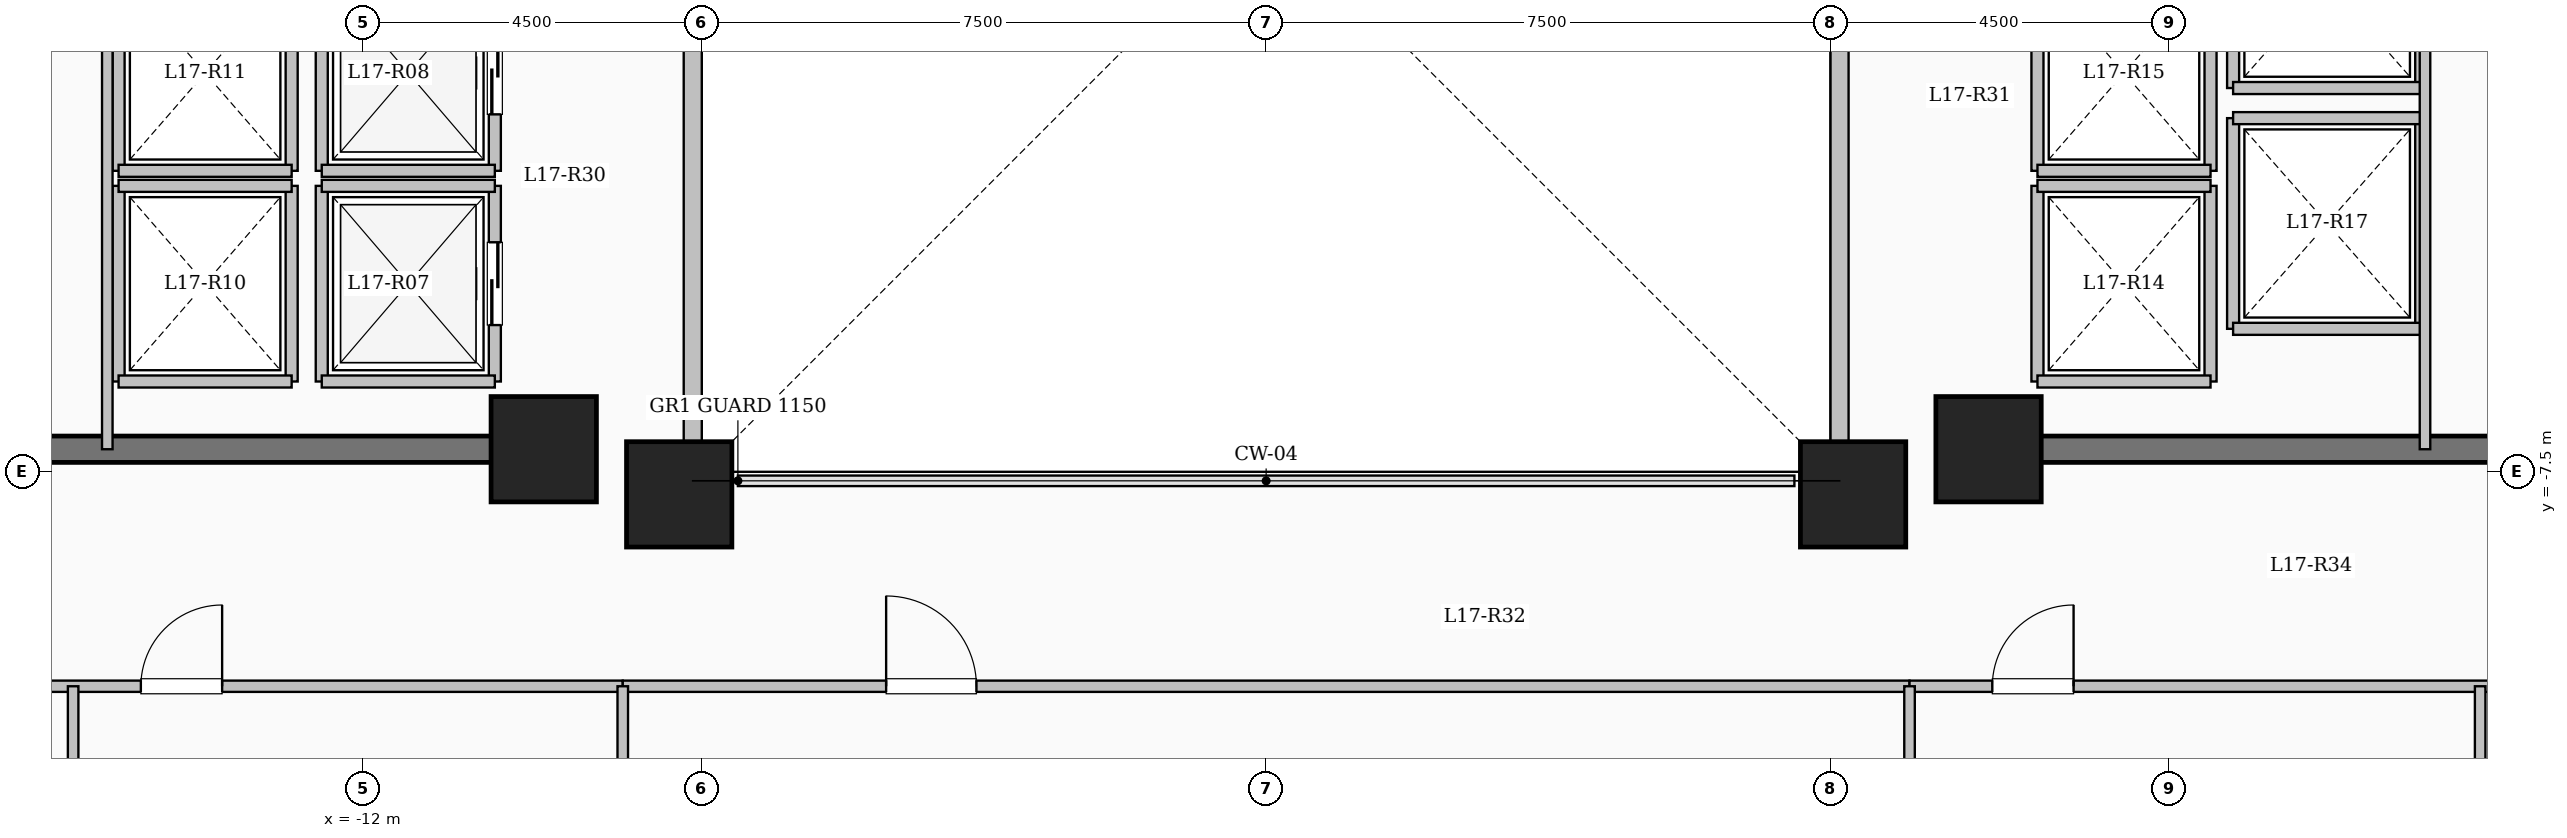
"""IFC4 building model, lengths in metres.
Left out: names, types, materials, properties, quantities, classifications, styles, units other than length and angle.
Written with IfcOpenShell. Run it as: python <this file> out.ifc"""

import sys

from ifc_helpers import new_model, si_unit, direction, frame, frame_2d, origin, origin_2d, place, context, subcontext, project, spatial, rectangle, extrude, element, fill, save


model = new_model("IFC4")
c1 = context("Model", 3, precision=1e-05, world=origin(), true_north=direction((0.0, 1.0)))
c2 = subcontext(c1, "Body", "Model", "MODEL_VIEW")
j1 = project(units=[si_unit("LENGTHUNIT", "METRE"), si_unit("PLANEANGLEUNIT", "RADIAN")], contexts=[c1])
p1 = place(None, origin())
s1 = spatial("IfcSite", under=j1, at=p1, CompositionType="ELEMENT")
p2 = place(p1, origin())
s2 = spatial("IfcBuilding", under=s1, at=p2, CompositionType="ELEMENT")
p3 = place(p2, frame((0.0, 0.0, 64.2)))
s3 = spatial("IfcBuildingStorey", under=s2, at=p3, CompositionType="ELEMENT", Elevation=64.2)
for number, where, z_axis, x_axis in (
    (1, (-7.8, -7.8, 0.0), (0.0, 0.0, 1.0), (1.0, 0.0, 0.0)),
    (2, (7.8, -7.8, 0.0), (0.0, 0.0, 1.0), (1.0, 0.0, 0.0)),
    (3, (-9.6, -7.2, 0.0), (0.0, 0.0, 1.0), (1.0, 0.0, 0.0)),
    (4, (9.6, -7.2, 0.0), (0.0, 0.0, 1.0), (1.0, 0.0, 0.0)),
):
    element("IfcColumn", number, at=place(p3, frame(where, z_axis=z_axis, x_axis=x_axis)), inside=s3, PredefinedType="COLUMN", context=c2, shape_type="SweptSolid", body=[
        extrude(rectangle(XDim=1.4, YDim=1.4, at=origin_2d()), origin(), (0.0, 0.0, 1.0), 4.5),
    ])
p4 = place(p3, frame((7.62, -7.62, 0.0), z_axis=(0.0, 0.0, 1.0), x_axis=(0.0, 1.0, 0.0)))
e5 = element("IfcWall", 5, at=p4, inside=s3, PredefinedType="SOLIDWALL", context=c2, shape_type="SweptSolid", body=[
    extrude(rectangle(XDim=15.24, YDim=0.24, at=frame_2d((7.62, 0.0))), origin(), (0.0, 0.0, 1.0), 4.2),
])
p5 = place(p4, frame((6.92, 0.0, 0.95)))
e6 = element("IfcOpeningElement", 6, at=p5, cuts=e5, PredefinedType="OPENING", context=c2, shape_type="SweptSolid", body=[
    extrude(rectangle(XDim=1.4, YDim=1.5, at=frame_2d((0.7, 0.75))), frame((0.0, 0.13, 0.0), z_axis=(0.0, -1.0, 0.0), x_axis=(1.0, 0.0, 0.0)), (0.0, 0.0, 1.0), 0.26),
])
p6 = place(p3, frame((-7.62, 7.62, 0.0), z_axis=(0.0, 0.0, 1.0), x_axis=(0.0, -1.0, 0.0)))
e7 = element("IfcWall", 7, at=p6, inside=s3, PredefinedType="SOLIDWALL", context=c2, shape_type="SweptSolid", body=[
    extrude(rectangle(XDim=15.24, YDim=0.24, at=frame_2d((7.62, 0.0))), origin(), (0.0, 0.0, 1.0), 4.2),
])
p7 = place(p6, frame((6.92, 0.0, 0.95)))
e8 = element("IfcOpeningElement", 8, at=p7, cuts=e7, PredefinedType="OPENING", context=c2, shape_type="SweptSolid", body=[
    extrude(rectangle(XDim=1.4, YDim=1.5, at=frame_2d((0.7, 0.75))), frame((0.0, 0.13, 0.0), z_axis=(0.0, -1.0, 0.0), x_axis=(1.0, 0.0, 0.0)), (0.0, 0.0, 1.0), 0.26),
])
p8 = place(p3, frame((-12.55, -6.3, 0.0), z_axis=(0.0, 0.0, 1.0), x_axis=(0.0, 1.0, 0.0)))
e9 = element("IfcWall", 9, at=p8, inside=s3, PredefinedType="SOLIDWALL", context=c2, shape_type="SweptSolid", body=[
    extrude(rectangle(XDim=2.6, YDim=0.16, at=frame_2d((1.3, 0.0))), origin(), (0.0, 0.0, 1.0), 4.2),
])
p9 = place(p3, frame((-10.25, -6.3, 0.0), z_axis=(0.0, 0.0, 1.0), x_axis=(0.0, 1.0, 0.0)))
e10 = element("IfcWall", 10, at=p9, inside=s3, PredefinedType="SOLIDWALL", context=c2, shape_type="SweptSolid", body=[
    extrude(rectangle(XDim=2.6, YDim=0.16, at=frame_2d((1.3, 0.0))), origin(), (0.0, 0.0, 1.0), 4.2),
])
p10 = place(p9, frame((0.75, 0.0, 0.0)))
e11 = element("IfcOpeningElement", 11, at=p10, cuts=e10, PredefinedType="OPENING", context=c2, shape_type="SweptSolid", body=[
    extrude(rectangle(XDim=1.1, YDim=2.15, at=frame_2d((0.55, 1.075))), frame((0.0, 0.09, 0.0), z_axis=(0.0, -1.0, 0.0), x_axis=(1.0, 0.0, 0.0)), (0.0, 0.0, 1.0), 0.18),
])
for number, where, z_axis, x_axis in (
    (12, (-12.55, -6.3, 0.0), (0.0, 0.0, 1.0), (1.0, 0.0, 0.0)),
    (13, (-12.55, -3.7, 0.0), (0.0, 0.0, 1.0), (1.0, 0.0, 0.0)),
):
    element("IfcWall", number, at=place(p3, frame(where, z_axis=z_axis, x_axis=x_axis)), inside=s3, PredefinedType="SOLIDWALL", context=c2, shape_type="SweptSolid", body=[
        extrude(rectangle(XDim=2.3, YDim=0.16, at=frame_2d((1.15, 0.0))), origin(), (0.0, 0.0, 1.0), 4.2),
    ])
p11 = place(p3, frame((-12.55, -3.5, 0.0), z_axis=(0.0, 0.0, 1.0), x_axis=(0.0, 1.0, 0.0)))
e14 = element("IfcWall", 14, at=p11, inside=s3, PredefinedType="SOLIDWALL", context=c2, shape_type="SweptSolid", body=[
    extrude(rectangle(XDim=2.6, YDim=0.16, at=frame_2d((1.3, 0.0))), origin(), (0.0, 0.0, 1.0), 4.2),
])
p12 = place(p3, frame((-10.25, -3.5, 0.0), z_axis=(0.0, 0.0, 1.0), x_axis=(0.0, 1.0, 0.0)))
e15 = element("IfcWall", 15, at=p12, inside=s3, PredefinedType="SOLIDWALL", context=c2, shape_type="SweptSolid", body=[
    extrude(rectangle(XDim=2.6, YDim=0.16, at=frame_2d((1.3, 0.0))), origin(), (0.0, 0.0, 1.0), 4.2),
])
p13 = place(p12, frame((0.75, 0.0, 0.0)))
e16 = element("IfcOpeningElement", 16, at=p13, cuts=e15, PredefinedType="OPENING", context=c2, shape_type="SweptSolid", body=[
    extrude(rectangle(XDim=1.1, YDim=2.15, at=frame_2d((0.55, 1.075))), frame((0.0, 0.09, 0.0), z_axis=(0.0, -1.0, 0.0), x_axis=(1.0, 0.0, 0.0)), (0.0, 0.0, 1.0), 0.18),
])
p14 = place(p3, frame((-12.55, -3.5, 0.0), z_axis=(0.0, 0.0, 1.0), x_axis=(1.0, 0.0, 0.0)))
e17 = element("IfcWall", 17, at=p14, inside=s3, PredefinedType="SOLIDWALL", context=c2, shape_type="SweptSolid", body=[
    extrude(rectangle(XDim=2.3, YDim=0.16, at=frame_2d((1.15, 0.0))), origin(), (0.0, 0.0, 1.0), 4.2),
])
for number, where, z_axis, x_axis in (
    (18, (-15.25, -6.3, 0.0), (0.0, 0.0, 1.0), (0.0, 1.0, 0.0)),
    (19, (-12.95, -6.3, 0.0), (0.0, 0.0, 1.0), (0.0, 1.0, 0.0)),
):
    element("IfcWall", number, at=place(p3, frame(where, z_axis=z_axis, x_axis=x_axis)), inside=s3, PredefinedType="SOLIDWALL", context=c2, shape_type="SweptSolid", body=[
        extrude(rectangle(XDim=2.6, YDim=0.16, at=frame_2d((1.3, 0.0))), origin(), (0.0, 0.0, 1.0), 4.2),
    ])
for number, where, z_axis, x_axis in (
    (20, (-15.25, -6.3, 0.0), (0.0, 0.0, 1.0), (1.0, 0.0, 0.0)),
    (21, (-15.25, -3.7, 0.0), (0.0, 0.0, 1.0), (1.0, 0.0, 0.0)),
):
    element("IfcWall", number, at=place(p3, frame(where, z_axis=z_axis, x_axis=x_axis)), inside=s3, PredefinedType="SOLIDWALL", context=c2, shape_type="SweptSolid", body=[
        extrude(rectangle(XDim=2.3, YDim=0.16, at=frame_2d((1.15, 0.0))), origin(), (0.0, 0.0, 1.0), 4.2),
    ])
for number, where, z_axis, x_axis in (
    (22, (-15.25, -3.5, 0.0), (0.0, 0.0, 1.0), (0.0, 1.0, 0.0)),
    (23, (-12.95, -3.5, 0.0), (0.0, 0.0, 1.0), (0.0, 1.0, 0.0)),
):
    element("IfcWall", number, at=place(p3, frame(where, z_axis=z_axis, x_axis=x_axis)), inside=s3, PredefinedType="SOLIDWALL", context=c2, shape_type="SweptSolid", body=[
        extrude(rectangle(XDim=2.6, YDim=0.16, at=frame_2d((1.3, 0.0))), origin(), (0.0, 0.0, 1.0), 4.2),
    ])
p15 = place(p3, frame((-15.25, -3.5, 0.0), z_axis=(0.0, 0.0, 1.0), x_axis=(1.0, 0.0, 0.0)))
e24 = element("IfcWall", 24, at=p15, inside=s3, PredefinedType="SOLIDWALL", context=c2, shape_type="SweptSolid", body=[
    extrude(rectangle(XDim=2.3, YDim=0.16, at=frame_2d((1.15, 0.0))), origin(), (0.0, 0.0, 1.0), 4.2),
])
for number, where, z_axis, x_axis in (
    (25, (10.25, -6.3, 0.0), (0.0, 0.0, 1.0), (0.0, 1.0, 0.0)),
    (26, (12.55, -6.3, 0.0), (0.0, 0.0, 1.0), (0.0, 1.0, 0.0)),
):
    element("IfcWall", number, at=place(p3, frame(where, z_axis=z_axis, x_axis=x_axis)), inside=s3, PredefinedType="SOLIDWALL", context=c2, shape_type="SweptSolid", body=[
        extrude(rectangle(XDim=2.6, YDim=0.16, at=frame_2d((1.3, 0.0))), origin(), (0.0, 0.0, 1.0), 4.2),
    ])
for number, where, z_axis, x_axis in (
    (27, (10.25, -6.3, 0.0), (0.0, 0.0, 1.0), (1.0, 0.0, 0.0)),
    (28, (10.25, -3.7, 0.0), (0.0, 0.0, 1.0), (1.0, 0.0, 0.0)),
):
    element("IfcWall", number, at=place(p3, frame(where, z_axis=z_axis, x_axis=x_axis)), inside=s3, PredefinedType="SOLIDWALL", context=c2, shape_type="SweptSolid", body=[
        extrude(rectangle(XDim=2.3, YDim=0.16, at=frame_2d((1.15, 0.0))), origin(), (0.0, 0.0, 1.0), 4.2),
    ])
for number, where, z_axis, x_axis in (
    (29, (10.25, -3.5, 0.0), (0.0, 0.0, 1.0), (0.0, 1.0, 0.0)),
    (30, (12.55, -3.5, 0.0), (0.0, 0.0, 1.0), (0.0, 1.0, 0.0)),
):
    element("IfcWall", number, at=place(p3, frame(where, z_axis=z_axis, x_axis=x_axis)), inside=s3, PredefinedType="SOLIDWALL", context=c2, shape_type="SweptSolid", body=[
        extrude(rectangle(XDim=2.6, YDim=0.16, at=frame_2d((1.3, 0.0))), origin(), (0.0, 0.0, 1.0), 4.2),
    ])
p16 = place(p3, frame((10.25, -3.5, 0.0), z_axis=(0.0, 0.0, 1.0), x_axis=(1.0, 0.0, 0.0)))
e31 = element("IfcWall", 31, at=p16, inside=s3, PredefinedType="SOLIDWALL", context=c2, shape_type="SweptSolid", body=[
    extrude(rectangle(XDim=2.3, YDim=0.16, at=frame_2d((1.15, 0.0))), origin(), (0.0, 0.0, 1.0), 4.2),
])
for number, where, z_axis, x_axis in (
    (32, (12.85, -5.6, 0.0), (0.0, 0.0, 1.0), (0.0, 1.0, 0.0)),
    (33, (15.35, -5.6, 0.0), (0.0, 0.0, 1.0), (0.0, 1.0, 0.0)),
):
    element("IfcWall", number, at=place(p3, frame(where, z_axis=z_axis, x_axis=x_axis)), inside=s3, PredefinedType="SOLIDWALL", context=c2, shape_type="SweptSolid", body=[
        extrude(rectangle(XDim=2.8, YDim=0.16, at=frame_2d((1.4, 0.0))), origin(), (0.0, 0.0, 1.0), 4.2),
    ])
for number, where, z_axis, x_axis in (
    (34, (12.85, -5.6, 0.0), (0.0, 0.0, 1.0), (1.0, 0.0, 0.0)),
    (35, (12.85, -2.8, 0.0), (0.0, 0.0, 1.0), (1.0, 0.0, 0.0)),
):
    element("IfcWall", number, at=place(p3, frame(where, z_axis=z_axis, x_axis=x_axis)), inside=s3, PredefinedType="SOLIDWALL", context=c2, shape_type="SweptSolid", body=[
        extrude(rectangle(XDim=2.5, YDim=0.16, at=frame_2d((1.25, 0.0))), origin(), (0.0, 0.0, 1.0), 4.2),
    ])
for number, where, z_axis, x_axis in (
    (36, (12.85, -2.4, 0.0), (0.0, 0.0, 1.0), (0.0, 1.0, 0.0)),
    (37, (15.35, -2.4, 0.0), (0.0, 0.0, 1.0), (0.0, 1.0, 0.0)),
):
    element("IfcWall", number, at=place(p3, frame(where, z_axis=z_axis, x_axis=x_axis)), inside=s3, PredefinedType="SOLIDWALL", context=c2, shape_type="SweptSolid", body=[
        extrude(rectangle(XDim=2.8, YDim=0.16, at=frame_2d((1.4, 0.0))), origin(), (0.0, 0.0, 1.0), 4.2),
    ])
p17 = place(p3, frame((12.85, -2.4, 0.0), z_axis=(0.0, 0.0, 1.0), x_axis=(1.0, 0.0, 0.0)))
e38 = element("IfcWall", 38, at=p17, inside=s3, PredefinedType="SOLIDWALL", context=c2, shape_type="SweptSolid", body=[
    extrude(rectangle(XDim=2.5, YDim=0.16, at=frame_2d((1.25, 0.0))), origin(), (0.0, 0.0, 1.0), 4.2),
])
for number, where, z_axis, x_axis in (
    (39, (-18.625, -7.2, 0.0), (0.0, 0.0, 1.0), (1.0, 0.0, 0.0)),
    (40, (10.075, -7.2, 0.0), (0.0, 0.0, 1.0), (1.0, 0.0, 0.0)),
):
    element("IfcWall", number, at=place(p3, frame(where, z_axis=z_axis, x_axis=x_axis)), inside=s3, PredefinedType="SHEAR", context=c2, shape_type="SweptSolid", body=[
        extrude(rectangle(XDim=8.55, YDim=0.35, at=frame_2d((4.275, 0.0))), origin(), (0.0, 0.0, 1.0), 4.5),
    ])
p18 = place(p3, frame((-15.4, -7.2, 0.0), z_axis=(0.0, 0.0, 1.0), x_axis=(0.0, 1.0, 0.0)))
e41 = element("IfcWall", 41, at=p18, inside=s3, PredefinedType="PARTITIONING", context=c2, shape_type="SweptSolid", body=[
    extrude(rectangle(XDim=10.45, YDim=0.14, at=frame_2d((5.225, 0.0))), origin(), (0.0, 0.0, 1.0), 4.2),
])
p19 = place(p18, frame((9.25, 0.0, 0.0)))
e42 = element("IfcOpeningElement", 42, at=p19, cuts=e41, PredefinedType="OPENING", context=c2, shape_type="SweptSolid", body=[
    extrude(rectangle(XDim=0.9, YDim=2.08, at=frame_2d((0.45, 1.04))), frame((0.0, 0.08, 0.0), z_axis=(0.0, -1.0, 0.0), x_axis=(1.0, 0.0, 0.0)), (0.0, 0.0, 1.0), 0.16),
])
p20 = place(p3, frame((15.4, -7.2, 0.0), z_axis=(0.0, 0.0, 1.0), x_axis=(0.0, 1.0, 0.0)))
e43 = element("IfcWall", 43, at=p20, inside=s3, PredefinedType="PARTITIONING", context=c2, shape_type="SweptSolid", body=[
    extrude(rectangle(XDim=10.45, YDim=0.14, at=frame_2d((5.225, 0.0))), origin(), (0.0, 0.0, 1.0), 4.2),
])
p21 = place(p20, frame((9.25, 0.0, 0.0)))
e44 = element("IfcOpeningElement", 44, at=p21, cuts=e43, PredefinedType="OPENING", context=c2, shape_type="SweptSolid", body=[
    extrude(rectangle(XDim=0.9, YDim=2.08, at=frame_2d((0.45, 1.04))), frame((0.0, 0.08, 0.0), z_axis=(0.0, -1.0, 0.0), x_axis=(1.0, 0.0, 0.0)), (0.0, 0.0, 1.0), 0.16),
])
p22 = place(p3, frame((-22.55, -10.35, 0.0), z_axis=(0.0, 0.0, 1.0), x_axis=(1.0, 0.0, 0.0)))
e45 = element("IfcWall", 45, at=p22, inside=s3, PredefinedType="PARTITIONING", context=c2, shape_type="SweptSolid", body=[
    extrude(rectangle(XDim=14.0, YDim=0.15, at=frame_2d((7.0, 0.0))), origin(), (0.0, 0.0, 1.0), 4.2),
])
p23 = place(p22, frame((1.1, 0.0, 0.0)))
e46 = element("IfcOpeningElement", 46, at=p23, cuts=e45, PredefinedType="OPENING", context=c2, shape_type="SweptSolid", body=[
    extrude(rectangle(XDim=1.08, YDim=2.15, at=frame_2d((0.54, 1.075))), frame((0.0, 0.085, 0.0), z_axis=(0.0, -1.0, 0.0), x_axis=(1.0, 0.0, 0.0)), (0.0, 0.0, 1.0), 0.17),
])
p24 = place(p22, frame((7.596, 0.0, 0.0)))
e47 = element("IfcOpeningElement", 47, at=p24, cuts=e45, PredefinedType="OPENING", context=c2, shape_type="SweptSolid", body=[
    extrude(rectangle(XDim=1.08, YDim=2.15, at=frame_2d((0.54, 1.075))), frame((0.0, 0.085, 0.0), z_axis=(0.0, -1.0, 0.0), x_axis=(1.0, 0.0, 0.0)), (0.0, 0.0, 1.0), 0.17),
])
p25 = place(p3, frame((-8.55, -10.35, 0.0), z_axis=(0.0, 0.0, 1.0), x_axis=(1.0, 0.0, 0.0)))
e48 = element("IfcWall", 48, at=p25, inside=s3, PredefinedType="PARTITIONING", context=c2, shape_type="SweptSolid", body=[
    extrude(rectangle(XDim=17.1, YDim=0.15, at=frame_2d((8.55, 0.0))), origin(), (0.0, 0.0, 1.0), 4.2),
])
p26 = place(p25, frame((3.5, 0.0, 0.0)))
e49 = element("IfcOpeningElement", 49, at=p26, cuts=e48, PredefinedType="OPENING", context=c2, shape_type="SweptSolid", body=[
    extrude(rectangle(XDim=1.2, YDim=2.15, at=frame_2d((0.6, 1.075))), frame((0.0, 0.085, 0.0), z_axis=(0.0, -1.0, 0.0), x_axis=(1.0, 0.0, 0.0)), (0.0, 0.0, 1.0), 0.17),
])
p27 = place(p3, frame((8.55, -10.35, 0.0), z_axis=(0.0, 0.0, 1.0), x_axis=(1.0, 0.0, 0.0)))
e50 = element("IfcWall", 50, at=p27, inside=s3, PredefinedType="PARTITIONING", context=c2, shape_type="SweptSolid", body=[
    extrude(rectangle(XDim=14.0, YDim=0.15, at=frame_2d((7.0, 0.0))), origin(), (0.0, 0.0, 1.0), 4.2),
])
p28 = place(p27, frame((1.1, 0.0, 0.0)))
e51 = element("IfcOpeningElement", 51, at=p28, cuts=e50, PredefinedType="OPENING", context=c2, shape_type="SweptSolid", body=[
    extrude(rectangle(XDim=1.08, YDim=2.15, at=frame_2d((0.54, 1.075))), frame((0.0, 0.085, 0.0), z_axis=(0.0, -1.0, 0.0), x_axis=(1.0, 0.0, 0.0)), (0.0, 0.0, 1.0), 0.17),
])
p29 = place(p27, frame((8.583, 0.0, 0.0)))
e52 = element("IfcOpeningElement", 52, at=p29, cuts=e50, PredefinedType="OPENING", context=c2, shape_type="SweptSolid", body=[
    extrude(rectangle(XDim=1.2, YDim=2.15, at=frame_2d((0.6, 1.075))), frame((0.0, 0.085, 0.0), z_axis=(0.0, -1.0, 0.0), x_axis=(1.0, 0.0, 0.0)), (0.0, 0.0, 1.0), 0.17),
])
p30 = place(p3, frame((-15.854, -23.6, 0.0), z_axis=(0.0, 0.0, 1.0), x_axis=(0.0, 1.0, 0.0)))
e53 = element("IfcWall", 53, at=p30, inside=s3, PredefinedType="PARTITIONING", context=c2, shape_type="SweptSolid", body=[
    extrude(rectangle(XDim=13.25, YDim=0.14, at=frame_2d((6.625, 0.0))), origin(), (0.0, 0.0, 1.0), 4.2),
])
for number, where, z_axis, x_axis in (
    (54, (-8.55, -24.204, 0.0), (0.0, 0.0, 1.0), (0.0, 1.0, 0.0)),
    (55, (8.55, -24.204, 0.0), (0.0, 0.0, 1.0), (0.0, 1.0, 0.0)),
):
    element("IfcWall", number, at=place(p3, frame(where, z_axis=z_axis, x_axis=x_axis)), inside=s3, PredefinedType="PARTITIONING", context=c2, shape_type="SweptSolid", body=[
        extrude(rectangle(XDim=13.854, YDim=0.14, at=frame_2d((6.927, 0.0))), origin(), (0.0, 0.0, 1.0), 4.2),
    ])
p31 = place(p3, frame((16.133, -23.6, 0.0), z_axis=(0.0, 0.0, 1.0), x_axis=(0.0, 1.0, 0.0)))
e56 = element("IfcWall", 56, at=p31, inside=s3, PredefinedType="PARTITIONING", context=c2, shape_type="SweptSolid", body=[
    extrude(rectangle(XDim=13.25, YDim=0.14, at=frame_2d((6.625, 0.0))), origin(), (0.0, 0.0, 1.0), 4.2),
])
p32 = place(p10, origin())
e57 = element("IfcDoor", 57, at=p32, inside=s3, OperationType="SLIDING_TO_LEFT", PredefinedType="DOOR", context=c2, shape_type="SweptSolid", body=[
    extrude(rectangle(XDim=1.1, YDim=2.15, at=frame_2d((0.55, 1.075))), frame((0.0, 0.025, 0.0), z_axis=(0.0, -1.0, 0.0), x_axis=(1.0, 0.0, 0.0)), (0.0, 0.0, 1.0), 0.05),
])
fill(e11, e57)
p33 = place(p13, origin())
e58 = element("IfcDoor", 58, at=p33, inside=s3, OperationType="SLIDING_TO_LEFT", PredefinedType="DOOR", context=c2, shape_type="SweptSolid", body=[
    extrude(rectangle(XDim=1.1, YDim=2.15, at=frame_2d((0.55, 1.075))), frame((0.0, 0.025, 0.0), z_axis=(0.0, -1.0, 0.0), x_axis=(1.0, 0.0, 0.0)), (0.0, 0.0, 1.0), 0.05),
])
fill(e16, e58)
p34 = place(p24, origin())
e59 = element("IfcDoor", 59, at=p34, inside=s3, OperationType="SINGLE_SWING_RIGHT", PredefinedType="DOOR", context=c2, shape_type="SweptSolid", body=[
    extrude(rectangle(XDim=1.08, YDim=2.15, at=frame_2d((0.54, 1.075))), frame((0.0, 0.025, 0.0), z_axis=(0.0, -1.0, 0.0), x_axis=(1.0, 0.0, 0.0)), (0.0, 0.0, 1.0), 0.05),
])
fill(e47, e59)
p35 = place(p26, origin())
e60 = element("IfcDoor", 60, at=p35, inside=s3, OperationType="SINGLE_SWING_LEFT", PredefinedType="DOOR", context=c2, shape_type="SweptSolid", body=[
    extrude(rectangle(XDim=1.2, YDim=2.15, at=frame_2d((0.6, 1.075))), frame((0.0, 0.025, 0.0), z_axis=(0.0, -1.0, 0.0), x_axis=(1.0, 0.0, 0.0)), (0.0, 0.0, 1.0), 0.05),
])
fill(e49, e60)
p36 = place(p28, origin())
e61 = element("IfcDoor", 61, at=p36, inside=s3, OperationType="SINGLE_SWING_RIGHT", PredefinedType="DOOR", context=c2, shape_type="SweptSolid", body=[
    extrude(rectangle(XDim=1.08, YDim=2.15, at=frame_2d((0.54, 1.075))), frame((0.0, 0.025, 0.0), z_axis=(0.0, -1.0, 0.0), x_axis=(1.0, 0.0, 0.0)), (0.0, 0.0, 1.0), 0.05),
])
fill(e51, e61)
save(model, sys.argv[1])
